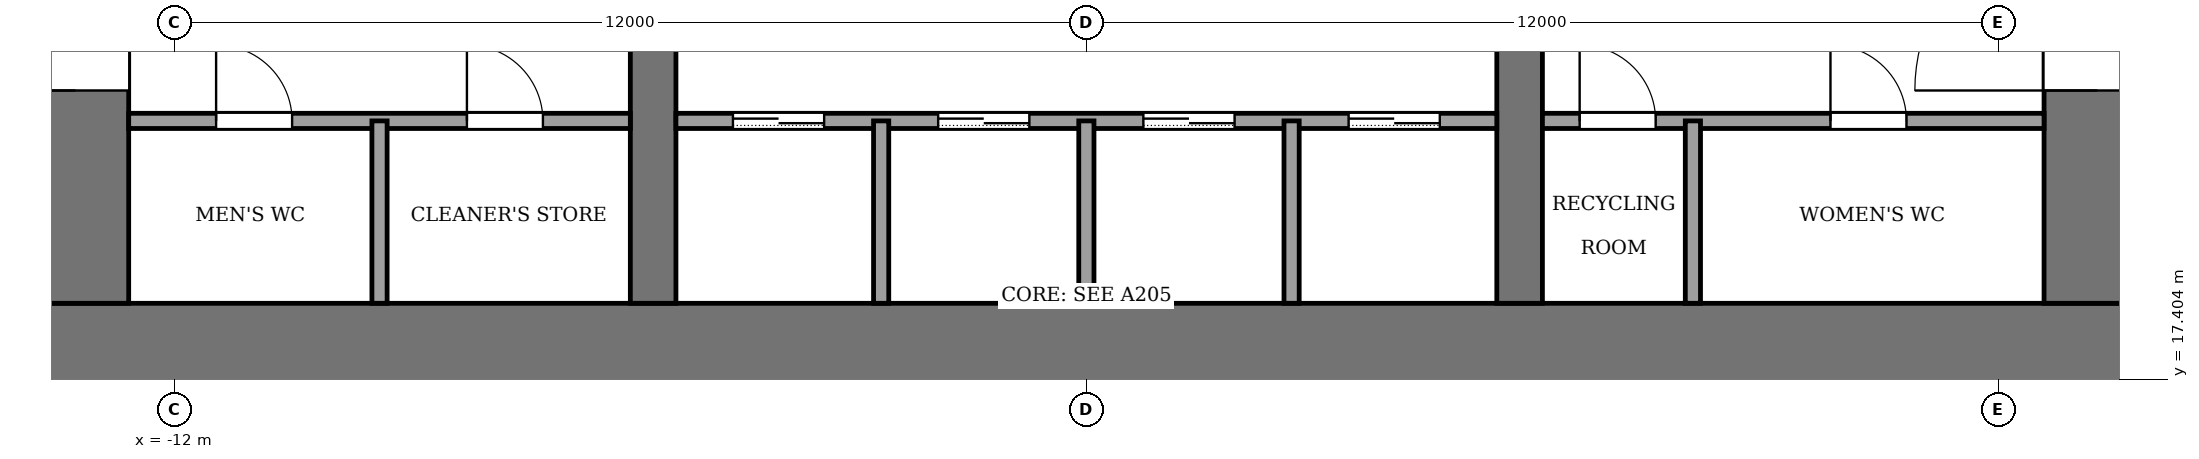
"""IFC4 building model, lengths in metres.
Left out: names, types, materials, properties, quantities, classifications, styles, units other than length and angle.
Written with IfcOpenShell. Run it as: python <this file> out.ifc"""

import sys

from ifc_helpers import new_model, si_unit, direction, frame, frame_2d, origin, place, context, subcontext, project, spatial, rectangle, extrude, element, fill, save


model = new_model("IFC4")
c1 = context("Model", 3, precision=1e-05, world=origin(), true_north=direction((0.0, 1.0)))
c2 = subcontext(c1, "Body", "Model", "MODEL_VIEW")
j1 = project(units=[si_unit("LENGTHUNIT", "METRE"), si_unit("PLANEANGLEUNIT", "RADIAN")], contexts=[c1])
p1 = place(None, origin())
s1 = spatial("IfcSite", under=j1, at=p1, CompositionType="ELEMENT")
p2 = place(p1, origin())
s2 = spatial("IfcBuilding", under=s1, at=p2, CompositionType="ELEMENT")
p3 = place(p2, frame((0.0, 0.0, 22.0)))
s3 = spatial("IfcBuildingStorey", under=s2, at=p3, CompositionType="ELEMENT", Elevation=22.0)
p4 = place(p3, frame((-14.0, 17.7, -0.13), z_axis=(0.0, 0.0, 1.0), x_axis=(1.0, 0.0, 0.0)))
e1 = element("IfcWall", 1, at=p4, inside=s3, PredefinedType="SHEAR", context=c2, shape_type="SweptSolid", body=[
    extrude(rectangle(XDim=28.0, YDim=1.4, at=frame_2d((14.0, 0.0))), origin(), (0.0, 0.0, 1.0), 4.0),
])
p5 = place(p3, frame((-13.3, 18.4, -0.13), z_axis=(0.0, 0.0, 1.0), x_axis=(0.0, 1.0, 0.0)))
e2 = element("IfcWall", 2, at=p5, inside=s3, PredefinedType="SHEAR", context=c2, shape_type="SweptSolid", body=[
    extrude(rectangle(XDim=19.2, YDim=1.4, at=frame_2d((9.6, 0.0))), origin(), (0.0, 0.0, 1.0), 4.0),
])
p6 = place(p5, frame((2.8, 0.0, 0.13)))
e3 = element("IfcOpeningElement", 3, at=p6, cuts=e2, PredefinedType="OPENING", context=c2, shape_type="SweptSolid", body=[
    extrude(rectangle(XDim=2.4, YDim=2.4, at=frame_2d((1.2, 1.2))), frame((0.0, 0.71, 0.0), z_axis=(0.0, -1.0, 0.0), x_axis=(1.0, 0.0, 0.0)), (0.0, 0.0, 1.0), 1.42),
])
p7 = place(p5, frame((13.4, 0.0, 0.13)))
e4 = element("IfcOpeningElement", 4, at=p7, cuts=e2, PredefinedType="OPENING", context=c2, shape_type="SweptSolid", body=[
    extrude(rectangle(XDim=1.4, YDim=2.2, at=frame_2d((0.7, 1.1))), frame((0.0, 0.71, 0.0), z_axis=(0.0, -1.0, 0.0), x_axis=(1.0, 0.0, 0.0)), (0.0, 0.0, 1.0), 1.42),
])
p8 = place(p3, frame((13.3, 18.4, -0.13), z_axis=(0.0, 0.0, 1.0), x_axis=(0.0, 1.0, 0.0)))
e5 = element("IfcWall", 5, at=p8, inside=s3, PredefinedType="SHEAR", context=c2, shape_type="SweptSolid", body=[
    extrude(rectangle(XDim=19.2, YDim=1.4, at=frame_2d((9.6, 0.0))), origin(), (0.0, 0.0, 1.0), 4.0),
])
p9 = place(p8, frame((2.8, 0.0, 0.13)))
e6 = element("IfcOpeningElement", 6, at=p9, cuts=e5, PredefinedType="OPENING", context=c2, shape_type="SweptSolid", body=[
    extrude(rectangle(XDim=2.4, YDim=2.4, at=frame_2d((1.2, 1.2))), frame((0.0, 0.71, 0.0), z_axis=(0.0, -1.0, 0.0), x_axis=(1.0, 0.0, 0.0)), (0.0, 0.0, 1.0), 1.42),
])
p10 = place(p8, frame((13.3, 0.0, 0.13)))
e7 = element("IfcOpeningElement", 7, at=p10, cuts=e5, PredefinedType="OPENING", context=c2, shape_type="SweptSolid", body=[
    extrude(rectangle(XDim=2.4, YDim=2.4, at=frame_2d((1.2, 1.2))), frame((0.0, 0.71, 0.0), z_axis=(0.0, -1.0, 0.0), x_axis=(1.0, 0.0, 0.0)), (0.0, 0.0, 1.0), 1.42),
])
p11 = place(p3, frame((-5.7, 18.4, -0.13), z_axis=(0.0, 0.0, 1.0), x_axis=(0.0, 1.0, 0.0)))
e8 = element("IfcWall", 8, at=p11, inside=s3, PredefinedType="SHEAR", context=c2, shape_type="SweptSolid", body=[
    extrude(rectangle(XDim=19.2, YDim=0.6, at=frame_2d((9.6, 0.0))), origin(), (0.0, 0.0, 1.0), 4.0),
])
p12 = place(p11, frame((8.35, 0.0, 0.13)))
e9 = element("IfcOpeningElement", 9, at=p12, cuts=e8, PredefinedType="OPENING", context=c2, shape_type="SweptSolid", body=[
    extrude(rectangle(XDim=0.9, YDim=2.1, at=frame_2d((0.45, 1.05))), frame((0.0, 0.31, 0.0), z_axis=(0.0, -1.0, 0.0), x_axis=(1.0, 0.0, 0.0)), (0.0, 0.0, 1.0), 0.62),
])
p13 = place(p3, frame((5.7, 18.4, -0.13), z_axis=(0.0, 0.0, 1.0), x_axis=(0.0, 1.0, 0.0)))
e10 = element("IfcWall", 10, at=p13, inside=s3, PredefinedType="SHEAR", context=c2, shape_type="SweptSolid", body=[
    extrude(rectangle(XDim=19.2, YDim=0.6, at=frame_2d((9.6, 0.0))), origin(), (0.0, 0.0, 1.0), 4.0),
])
p14 = place(p13, frame((8.35, 0.0, 0.13)))
e11 = element("IfcOpeningElement", 11, at=p14, cuts=e10, PredefinedType="OPENING", context=c2, shape_type="SweptSolid", body=[
    extrude(rectangle(XDim=0.9, YDim=2.1, at=frame_2d((0.45, 1.05))), frame((0.0, 0.31, 0.0), z_axis=(0.0, -1.0, 0.0), x_axis=(1.0, 0.0, 0.0)), (0.0, 0.0, 1.0), 0.62),
])
p15 = place(p13, frame((13.3, 0.0, 0.13)))
e12 = element("IfcOpeningElement", 12, at=p15, cuts=e10, PredefinedType="OPENING", context=c2, shape_type="SweptSolid", body=[
    extrude(rectangle(XDim=2.4, YDim=2.4, at=frame_2d((1.2, 1.2))), frame((0.0, 0.31, 0.0), z_axis=(0.0, -1.0, 0.0), x_axis=(1.0, 0.0, 0.0)), (0.0, 0.0, 1.0), 0.62),
])
p16 = place(p3, frame((-12.6, 20.8, 0.0), z_axis=(0.0, 0.0, 1.0), x_axis=(1.0, 0.0, 0.0)))
e13 = element("IfcWall", 13, at=p16, inside=s3, PredefinedType="PARTITIONING", context=c2, shape_type="SweptSolid", body=[
    extrude(rectangle(XDim=6.6, YDim=0.2, at=frame_2d((3.3, 0.0))), origin(), (0.0, 0.0, 1.0), 3.87),
])
p17 = place(p16, frame((1.15, 0.0, 0.0)))
e14 = element("IfcOpeningElement", 14, at=p17, cuts=e13, PredefinedType="OPENING", context=c2, shape_type="SweptSolid", body=[
    extrude(rectangle(XDim=1.0, YDim=2.1, at=frame_2d((0.5, 1.05))), frame((0.0, 0.11, 0.0), z_axis=(0.0, -1.0, 0.0), x_axis=(1.0, 0.0, 0.0)), (0.0, 0.0, 1.0), 0.22),
])
p18 = place(p16, frame((4.45, 0.0, 0.0)))
e15 = element("IfcOpeningElement", 15, at=p18, cuts=e13, PredefinedType="OPENING", context=c2, shape_type="SweptSolid", body=[
    extrude(rectangle(XDim=1.0, YDim=2.1, at=frame_2d((0.5, 1.05))), frame((0.0, 0.11, 0.0), z_axis=(0.0, -1.0, 0.0), x_axis=(1.0, 0.0, 0.0)), (0.0, 0.0, 1.0), 0.22),
])
p19 = place(p3, frame((-5.4, 20.8, 0.0), z_axis=(0.0, 0.0, 1.0), x_axis=(1.0, 0.0, 0.0)))
e16 = element("IfcWall", 16, at=p19, inside=s3, PredefinedType="PARTITIONING", context=c2, shape_type="SweptSolid", body=[
    extrude(rectangle(XDim=10.8, YDim=0.2, at=frame_2d((5.4, 0.0))), origin(), (0.0, 0.0, 1.0), 3.87),
])
p20 = place(p19, frame((0.75, 0.0, 0.0)))
e17 = element("IfcOpeningElement", 17, at=p20, cuts=e16, PredefinedType="OPENING", context=c2, shape_type="SweptSolid", body=[
    extrude(rectangle(XDim=1.2, YDim=2.2, at=frame_2d((0.6, 1.1))), frame((0.0, 0.11, 0.0), z_axis=(0.0, -1.0, 0.0), x_axis=(1.0, 0.0, 0.0)), (0.0, 0.0, 1.0), 0.22),
])
p21 = place(p19, frame((3.45, 0.0, 0.0)))
e18 = element("IfcOpeningElement", 18, at=p21, cuts=e16, PredefinedType="OPENING", context=c2, shape_type="SweptSolid", body=[
    extrude(rectangle(XDim=1.2, YDim=2.2, at=frame_2d((0.6, 1.1))), frame((0.0, 0.11, 0.0), z_axis=(0.0, -1.0, 0.0), x_axis=(1.0, 0.0, 0.0)), (0.0, 0.0, 1.0), 0.22),
])
p22 = place(p19, frame((6.15, 0.0, 0.0)))
e19 = element("IfcOpeningElement", 19, at=p22, cuts=e16, PredefinedType="OPENING", context=c2, shape_type="SweptSolid", body=[
    extrude(rectangle(XDim=1.2, YDim=2.2, at=frame_2d((0.6, 1.1))), frame((0.0, 0.11, 0.0), z_axis=(0.0, -1.0, 0.0), x_axis=(1.0, 0.0, 0.0)), (0.0, 0.0, 1.0), 0.22),
])
p23 = place(p19, frame((8.85, 0.0, 0.0)))
e20 = element("IfcOpeningElement", 20, at=p23, cuts=e16, PredefinedType="OPENING", context=c2, shape_type="SweptSolid", body=[
    extrude(rectangle(XDim=1.2, YDim=2.2, at=frame_2d((0.6, 1.1))), frame((0.0, 0.11, 0.0), z_axis=(0.0, -1.0, 0.0), x_axis=(1.0, 0.0, 0.0)), (0.0, 0.0, 1.0), 0.22),
])
p24 = place(p3, frame((6.0, 20.8, 0.0), z_axis=(0.0, 0.0, 1.0), x_axis=(1.0, 0.0, 0.0)))
e21 = element("IfcWall", 21, at=p24, inside=s3, PredefinedType="PARTITIONING", context=c2, shape_type="SweptSolid", body=[
    extrude(rectangle(XDim=6.6, YDim=0.2, at=frame_2d((3.3, 0.0))), origin(), (0.0, 0.0, 1.0), 3.87),
])
p25 = place(p24, frame((0.49, 0.0, 0.0)))
e22 = element("IfcOpeningElement", 22, at=p25, cuts=e21, PredefinedType="OPENING", context=c2, shape_type="SweptSolid", body=[
    extrude(rectangle(XDim=1.0, YDim=2.1, at=frame_2d((0.5, 1.05))), frame((0.0, 0.11, 0.0), z_axis=(0.0, -1.0, 0.0), x_axis=(1.0, 0.0, 0.0)), (0.0, 0.0, 1.0), 0.22),
])
p26 = place(p24, frame((3.79, 0.0, 0.0)))
e23 = element("IfcOpeningElement", 23, at=p26, cuts=e21, PredefinedType="OPENING", context=c2, shape_type="SweptSolid", body=[
    extrude(rectangle(XDim=1.0, YDim=2.1, at=frame_2d((0.5, 1.05))), frame((0.0, 0.11, 0.0), z_axis=(0.0, -1.0, 0.0), x_axis=(1.0, 0.0, 0.0)), (0.0, 0.0, 1.0), 0.22),
])
for number, where, z_axis, x_axis in (
    (24, (-9.3, 18.4, 0.0), (0.0, 0.0, 1.0), (0.0, 1.0, 0.0)),
    (25, (-2.7, 18.4, 0.0), (0.0, 0.0, 1.0), (0.0, 1.0, 0.0)),
    (26, (0.0, 18.4, 0.0), (0.0, 0.0, 1.0), (0.0, 1.0, 0.0)),
    (27, (2.7, 18.4, 0.0), (0.0, 0.0, 1.0), (0.0, 1.0, 0.0)),
    (28, (7.98, 18.4, 0.0), (0.0, 0.0, 1.0), (0.0, 1.0, 0.0)),
):
    element("IfcWall", number, at=place(p3, frame(where, z_axis=z_axis, x_axis=x_axis)), inside=s3, PredefinedType="PARTITIONING", context=c2, shape_type="SweptSolid", body=[
        extrude(rectangle(XDim=2.4, YDim=0.2, at=frame_2d((1.2, 0.0))), origin(), (0.0, 0.0, 1.0), 3.87),
    ])
p27 = place(p20, origin())
e29 = element("IfcDoor", 29, at=p27, inside=s3, OperationType="SLIDING_TO_LEFT", PredefinedType="DOOR", context=c2, shape_type="SweptSolid", body=[
    extrude(rectangle(XDim=1.2, YDim=2.2, at=frame_2d((0.6, 1.1))), frame((0.0, 0.025, 0.0), z_axis=(0.0, -1.0, 0.0), x_axis=(1.0, 0.0, 0.0)), (0.0, 0.0, 1.0), 0.05),
])
fill(e17, e29)
p28 = place(p21, origin())
e30 = element("IfcDoor", 30, at=p28, inside=s3, OperationType="SLIDING_TO_LEFT", PredefinedType="DOOR", context=c2, shape_type="SweptSolid", body=[
    extrude(rectangle(XDim=1.2, YDim=2.2, at=frame_2d((0.6, 1.1))), frame((0.0, 0.025, 0.0), z_axis=(0.0, -1.0, 0.0), x_axis=(1.0, 0.0, 0.0)), (0.0, 0.0, 1.0), 0.05),
])
fill(e18, e30)
p29 = place(p22, origin())
e31 = element("IfcDoor", 31, at=p29, inside=s3, OperationType="SLIDING_TO_LEFT", PredefinedType="DOOR", context=c2, shape_type="SweptSolid", body=[
    extrude(rectangle(XDim=1.2, YDim=2.2, at=frame_2d((0.6, 1.1))), frame((0.0, 0.025, 0.0), z_axis=(0.0, -1.0, 0.0), x_axis=(1.0, 0.0, 0.0)), (0.0, 0.0, 1.0), 0.05),
])
fill(e19, e31)
p30 = place(p23, origin())
e32 = element("IfcDoor", 32, at=p30, inside=s3, OperationType="SLIDING_TO_LEFT", PredefinedType="DOOR", context=c2, shape_type="SweptSolid", body=[
    extrude(rectangle(XDim=1.2, YDim=2.2, at=frame_2d((0.6, 1.1))), frame((0.0, 0.025, 0.0), z_axis=(0.0, -1.0, 0.0), x_axis=(1.0, 0.0, 0.0)), (0.0, 0.0, 1.0), 0.05),
])
fill(e20, e32)
p31 = place(p17, origin())
e33 = element("IfcDoor", 33, at=p31, inside=s3, OperationType="SINGLE_SWING_LEFT", PredefinedType="DOOR", context=c2, shape_type="SweptSolid", body=[
    extrude(rectangle(XDim=1.0, YDim=2.1, at=frame_2d((0.5, 1.05))), frame((0.0, 0.025, 0.0), z_axis=(0.0, -1.0, 0.0), x_axis=(1.0, 0.0, 0.0)), (0.0, 0.0, 1.0), 0.05),
])
fill(e14, e33)
p32 = place(p18, origin())
e34 = element("IfcDoor", 34, at=p32, inside=s3, OperationType="SINGLE_SWING_LEFT", PredefinedType="DOOR", context=c2, shape_type="SweptSolid", body=[
    extrude(rectangle(XDim=1.0, YDim=2.1, at=frame_2d((0.5, 1.05))), frame((0.0, 0.025, 0.0), z_axis=(0.0, -1.0, 0.0), x_axis=(1.0, 0.0, 0.0)), (0.0, 0.0, 1.0), 0.05),
])
fill(e15, e34)
p33 = place(p25, origin())
e35 = element("IfcDoor", 35, at=p33, inside=s3, OperationType="SINGLE_SWING_RIGHT", PredefinedType="DOOR", context=c2, shape_type="SweptSolid", body=[
    extrude(rectangle(XDim=1.0, YDim=2.1, at=frame_2d((0.5, 1.05))), frame((0.0, 0.025, 0.0), z_axis=(0.0, -1.0, 0.0), x_axis=(1.0, 0.0, 0.0)), (0.0, 0.0, 1.0), 0.05),
])
fill(e22, e35)
p34 = place(p26, origin())
e36 = element("IfcDoor", 36, at=p34, inside=s3, OperationType="SINGLE_SWING_RIGHT", PredefinedType="DOOR", context=c2, shape_type="SweptSolid", body=[
    extrude(rectangle(XDim=1.0, YDim=2.1, at=frame_2d((0.5, 1.05))), frame((0.0, 0.025, 0.0), z_axis=(0.0, -1.0, 0.0), x_axis=(1.0, 0.0, 0.0)), (0.0, 0.0, 1.0), 0.05),
])
fill(e23, e36)
p35 = place(p6, origin())
e37 = element("IfcDoor", 37, at=p35, inside=s3, OperationType="DOUBLE_DOOR_SINGLE_SWING", PredefinedType="DOOR", context=c2, shape_type="SweptSolid", body=[
    extrude(rectangle(XDim=2.4, YDim=2.4, at=frame_2d((1.2, 1.2))), frame((0.0, 0.025, 0.0), z_axis=(0.0, -1.0, 0.0), x_axis=(1.0, 0.0, 0.0)), (0.0, 0.0, 1.0), 0.05),
])
fill(e3, e37)
p36 = place(p9, origin())
e38 = element("IfcDoor", 38, at=p36, inside=s3, OperationType="DOUBLE_DOOR_SINGLE_SWING", PredefinedType="DOOR", context=c2, shape_type="SweptSolid", body=[
    extrude(rectangle(XDim=2.4, YDim=2.4, at=frame_2d((1.2, 1.2))), frame((0.0, 0.025, 0.0), z_axis=(0.0, -1.0, 0.0), x_axis=(1.0, 0.0, 0.0)), (0.0, 0.0, 1.0), 0.05),
])
fill(e6, e38)
save(model, sys.argv[1])
